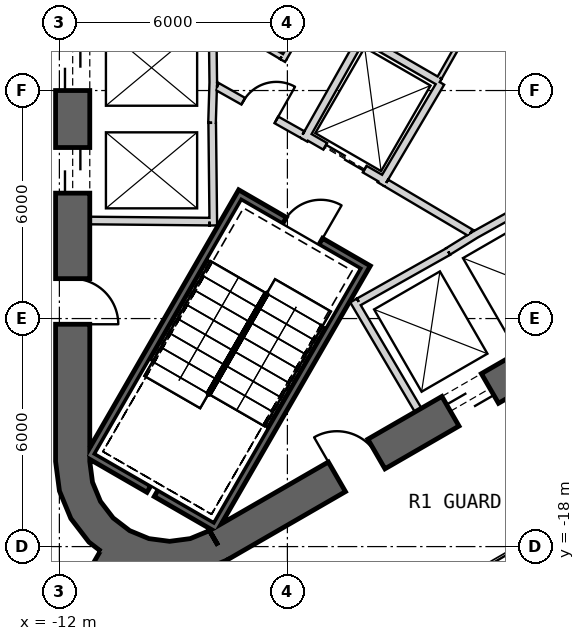
"""IFC4 building model, lengths in metres.
Left out: names, types, materials, properties, quantities, classifications, styles, units other than length and angle.
Written with IfcOpenShell. Run it as: python <this file> out.ifc"""

import sys

from ifc_helpers import new_model, si_unit, direction, frame, frame_2d, origin, place, context, subcontext, project, spatial, polyline, rectangle, outline, extrude, element, fill, save


model = new_model("IFC4")
c1 = context("Model", 3, precision=1e-05, world=origin(), true_north=direction((0.0, 1.0)))
c2 = subcontext(c1, "Body", "Model", "MODEL_VIEW")
j1 = project(units=[si_unit("LENGTHUNIT", "METRE"), si_unit("PLANEANGLEUNIT", "RADIAN")], contexts=[c1])
p1 = place(None, origin())
s1 = spatial("IfcSite", under=j1, at=p1, CompositionType="ELEMENT")
p2 = place(p1, origin())
s2 = spatial("IfcBuilding", under=s1, at=p2, CompositionType="ELEMENT")
p3 = place(p2, frame((0.0, 0.0, 27.5)))
s3 = spatial("IfcBuildingStorey", under=s2, at=p3, CompositionType="ELEMENT", Elevation=27.5)
p4 = place(p3, frame((-11.65, 15.762, 0.0), z_axis=(0.0, 0.0, 1.0), x_axis=(0.0, -1.0, 0.0)))
e1 = element("IfcWall", 1, at=p4, inside=s3, PredefinedType="SHEAR", context=c2, shape_type="SweptSolid", body=[
    extrude(rectangle(XDim=31.523, YDim=0.9, at=frame_2d((15.762, 0.0))), origin(), (0.0, 0.0, 1.0), 6.0),
])
p5 = place(p4, frame((7.062, 0.0, 0.0)))
e2 = element("IfcOpeningElement", 2, at=p5, cuts=e1, PredefinedType="OPENING", context=c2, shape_type="SweptSolid", body=[
    extrude(rectangle(XDim=1.2, YDim=2.4, at=frame_2d((0.6, 1.2))), frame((0.0, 0.46, 0.0), z_axis=(0.0, -1.0, 0.0), x_axis=(1.0, 0.0, 0.0)), (0.0, 0.0, 1.0), 0.92),
])
p6 = place(p4, frame((9.762, 0.0, 0.0)))
e3 = element("IfcOpeningElement", 3, at=p6, cuts=e1, PredefinedType="OPENING", context=c2, shape_type="SweptSolid", body=[
    extrude(rectangle(XDim=1.2, YDim=2.4, at=frame_2d((0.6, 1.2))), frame((0.0, 0.46, 0.0), z_axis=(0.0, -1.0, 0.0), x_axis=(1.0, 0.0, 0.0)), (0.0, 0.0, 1.0), 0.92),
])
p7 = place(p4, frame((12.462, 0.0, 0.0)))
e4 = element("IfcOpeningElement", 4, at=p7, cuts=e1, PredefinedType="OPENING", context=c2, shape_type="SweptSolid", body=[
    extrude(rectangle(XDim=1.2, YDim=2.4, at=frame_2d((0.6, 1.2))), frame((0.0, 0.46, 0.0), z_axis=(0.0, -1.0, 0.0), x_axis=(1.0, 0.0, 0.0)), (0.0, 0.0, 1.0), 0.92),
])
p8 = place(p4, frame((15.162, 0.0, 0.0)))
e5 = element("IfcOpeningElement", 5, at=p8, cuts=e1, PredefinedType="OPENING", context=c2, shape_type="SweptSolid", body=[
    extrude(rectangle(XDim=1.2, YDim=2.4, at=frame_2d((0.6, 1.2))), frame((0.0, 0.46, 0.0), z_axis=(0.0, -1.0, 0.0), x_axis=(1.0, 0.0, 0.0)), (0.0, 0.0, 1.0), 0.92),
])
p9 = place(p4, frame((17.862, 0.0, 0.0)))
e6 = element("IfcOpeningElement", 6, at=p9, cuts=e1, PredefinedType="OPENING", context=c2, shape_type="SweptSolid", body=[
    extrude(rectangle(XDim=1.2, YDim=2.4, at=frame_2d((0.6, 1.2))), frame((0.0, 0.46, 0.0), z_axis=(0.0, -1.0, 0.0), x_axis=(1.0, 0.0, 0.0)), (0.0, 0.0, 1.0), 0.92),
])
p10 = place(p4, frame((20.562, 0.0, 0.0)))
e7 = element("IfcOpeningElement", 7, at=p10, cuts=e1, PredefinedType="OPENING", context=c2, shape_type="SweptSolid", body=[
    extrude(rectangle(XDim=1.2, YDim=2.4, at=frame_2d((0.6, 1.2))), frame((0.0, 0.46, 0.0), z_axis=(0.0, -1.0, 0.0), x_axis=(1.0, 0.0, 0.0)), (0.0, 0.0, 1.0), 0.92),
])
p11 = place(p4, frame((23.262, 0.0, 0.0)))
e8 = element("IfcOpeningElement", 8, at=p11, cuts=e1, PredefinedType="OPENING", context=c2, shape_type="SweptSolid", body=[
    extrude(rectangle(XDim=1.2, YDim=2.4, at=frame_2d((0.6, 1.2))), frame((0.0, 0.46, 0.0), z_axis=(0.0, -1.0, 0.0), x_axis=(1.0, 0.0, 0.0)), (0.0, 0.0, 1.0), 0.92),
])
p12 = place(p4, frame((3.612, 0.0, 0.0)))
e9 = element("IfcOpeningElement", 9, at=p12, cuts=e1, PredefinedType="OPENING", context=c2, shape_type="SweptSolid", body=[
    extrude(rectangle(XDim=1.2, YDim=2.4, at=frame_2d((0.6, 1.2))), frame((0.0, 0.46, 0.0), z_axis=(0.0, -1.0, 0.0), x_axis=(1.0, 0.0, 0.0)), (0.0, 0.0, 1.0), 0.92),
])
p13 = place(p4, frame((26.712, 0.0, 0.0)))
e10 = element("IfcOpeningElement", 10, at=p13, cuts=e1, PredefinedType="OPENING", context=c2, shape_type="SweptSolid", body=[
    extrude(rectangle(XDim=1.2, YDim=2.4, at=frame_2d((0.6, 1.2))), frame((0.0, 0.46, 0.0), z_axis=(0.0, -1.0, 0.0), x_axis=(1.0, 0.0, 0.0)), (0.0, 0.0, 1.0), 0.92),
])
p14 = place(p3, frame((-7.825, -17.97, 0.0), z_axis=(0.0, 0.0, 1.0), x_axis=(0.866028369851, 0.499994862586, 0.0)))
e11 = element("IfcWall", 11, at=p14, inside=s3, PredefinedType="SHEAR", context=c2, shape_type="SweptSolid", body=[
    extrude(rectangle(XDim=31.523, YDim=0.9, at=frame_2d((15.762, 0.0))), origin(), (0.0, 0.0, 1.0), 6.0),
])
p15 = place(p14, frame((7.062, 0.0, 0.0)))
e12 = element("IfcOpeningElement", 12, at=p15, cuts=e11, PredefinedType="OPENING", context=c2, shape_type="SweptSolid", body=[
    extrude(rectangle(XDim=1.2, YDim=2.4, at=frame_2d((0.6, 1.2))), frame((0.0, 0.46, 0.0), z_axis=(0.0, -1.0, 0.0), x_axis=(1.0, 0.0, 0.0)), (0.0, 0.0, 1.0), 0.92),
])
p16 = place(p14, frame((9.762, 0.0, 0.0)))
e13 = element("IfcOpeningElement", 13, at=p16, cuts=e11, PredefinedType="OPENING", context=c2, shape_type="SweptSolid", body=[
    extrude(rectangle(XDim=1.2, YDim=2.4, at=frame_2d((0.6, 1.2))), frame((0.0, 0.46, 0.0), z_axis=(0.0, -1.0, 0.0), x_axis=(1.0, 0.0, 0.0)), (0.0, 0.0, 1.0), 0.92),
])
p17 = place(p14, frame((12.462, 0.0, 0.0)))
e14 = element("IfcOpeningElement", 14, at=p17, cuts=e11, PredefinedType="OPENING", context=c2, shape_type="SweptSolid", body=[
    extrude(rectangle(XDim=1.2, YDim=2.4, at=frame_2d((0.6, 1.2))), frame((0.0, 0.46, 0.0), z_axis=(0.0, -1.0, 0.0), x_axis=(1.0, 0.0, 0.0)), (0.0, 0.0, 1.0), 0.92),
])
p18 = place(p14, frame((15.162, 0.0, 0.0)))
e15 = element("IfcOpeningElement", 15, at=p18, cuts=e11, PredefinedType="OPENING", context=c2, shape_type="SweptSolid", body=[
    extrude(rectangle(XDim=1.2, YDim=2.4, at=frame_2d((0.6, 1.2))), frame((0.0, 0.46, 0.0), z_axis=(0.0, -1.0, 0.0), x_axis=(1.0, 0.0, 0.0)), (0.0, 0.0, 1.0), 0.92),
])
p19 = place(p14, frame((17.862, 0.0, 0.0)))
e16 = element("IfcOpeningElement", 16, at=p19, cuts=e11, PredefinedType="OPENING", context=c2, shape_type="SweptSolid", body=[
    extrude(rectangle(XDim=1.2, YDim=2.4, at=frame_2d((0.6, 1.2))), frame((0.0, 0.46, 0.0), z_axis=(0.0, -1.0, 0.0), x_axis=(1.0, 0.0, 0.0)), (0.0, 0.0, 1.0), 0.92),
])
p20 = place(p14, frame((20.562, 0.0, 0.0)))
e17 = element("IfcOpeningElement", 17, at=p20, cuts=e11, PredefinedType="OPENING", context=c2, shape_type="SweptSolid", body=[
    extrude(rectangle(XDim=1.2, YDim=2.4, at=frame_2d((0.6, 1.2))), frame((0.0, 0.46, 0.0), z_axis=(0.0, -1.0, 0.0), x_axis=(1.0, 0.0, 0.0)), (0.0, 0.0, 1.0), 0.92),
])
p21 = place(p14, frame((26.712, 0.0, 0.0)))
e18 = element("IfcOpeningElement", 18, at=p21, cuts=e11, PredefinedType="OPENING", context=c2, shape_type="SweptSolid", body=[
    extrude(rectangle(XDim=1.2, YDim=2.4, at=frame_2d((0.6, 1.2))), frame((0.0, 0.46, 0.0), z_axis=(0.0, -1.0, 0.0), x_axis=(1.0, 0.0, 0.0)), (0.0, 0.0, 1.0), 0.92),
])
p22 = place(p14, frame((3.612, 0.0, 0.0)))
e19 = element("IfcOpeningElement", 19, at=p22, cuts=e11, PredefinedType="OPENING", context=c2, shape_type="SweptSolid", body=[
    extrude(rectangle(XDim=1.2, YDim=2.4, at=frame_2d((0.6, 1.2))), frame((0.0, 0.46, 0.0), z_axis=(0.0, -1.0, 0.0), x_axis=(1.0, 0.0, 0.0)), (0.0, 0.0, 1.0), 0.92),
])
p23 = place(p3, origin())
e20 = element("IfcWall", 20, at=p23, inside=s3, PredefinedType="SHEAR", context=c2, shape_type="SweptSolid", body=[
    extrude(outline(polyline([(-12.1, -15.762), (-11.998, -16.538), (-11.698, -17.262), (-11.221, -17.883), (-10.6, -18.36), (-9.876, -18.659), (-9.1, -18.762), (-8.323, -18.659), (-7.6, -18.36), (-8.05, -17.58), (-8.556, -17.79), (-9.1, -17.862), (-9.644, -17.79), (-10.15, -17.58), (-10.585, -17.247), (-10.919, -16.812), (-11.128, -16.305), (-11.2, -15.762), (-12.1, -15.762)])), origin(), (0.0, 0.0, 1.0), 6.0),
])
p24 = place(p3, frame((-10.575, -18.316, 0.0), z_axis=(0.0, 0.0, 1.0), x_axis=(-0.499996575515, -0.866027380903, 0.0)))
e21 = element("IfcWall", 21, at=p24, inside=s3, PredefinedType="SHEAR", context=c2, shape_type="SweptSolid", body=[
    extrude(rectangle(XDim=13.954, YDim=0.8, at=frame_2d((6.977, 0.0))), origin(), (0.0, 0.0, 1.0), 6.0),
])
p25 = place(p24, frame((2.05, 0.0, 0.0)))
e22 = element("IfcOpeningElement", 22, at=p25, cuts=e21, PredefinedType="OPENING", context=c2, shape_type="SweptSolid", body=[
    extrude(rectangle(XDim=1.4, YDim=2.4, at=frame_2d((0.7, 1.2))), frame((0.0, 0.41, 0.0), z_axis=(0.0, -1.0, 0.0), x_axis=(1.0, 0.0, 0.0)), (0.0, 0.0, 1.0), 0.82),
])
p26 = place(p3, frame((-7.95, -5.772, 0.0), z_axis=(0.0, 0.0, 1.0), x_axis=(-0.030803413295, -0.999525462272, 0.0)))
e23 = element("IfcWall", 23, at=p26, inside=s3, PredefinedType="PLUMBINGWALL", context=c2, shape_type="SweptSolid", body=[
    extrude(rectangle(XDim=1.078, YDim=0.2, at=frame_2d((0.539, 0.0))), origin(), (0.0, 0.0, 1.0), 5.7),
])
p27 = place(p3, frame((-7.971, -4.05, 0.0), z_axis=(0.0, 0.0, 1.0), x_axis=(0.012042535896, -0.999927486035, 0.0)))
e24 = element("IfcWall", 24, at=p27, inside=s3, PredefinedType="PLUMBINGWALL", context=c2, shape_type="SweptSolid", body=[
    extrude(rectangle(XDim=1.845, YDim=0.2, at=frame_2d((0.922, 0.0))), origin(), (0.0, 0.0, 1.0), 5.7),
])
p28 = place(p3, frame((-7.979, -6.85, 0.0), z_axis=(0.0, 0.0, 1.0), x_axis=(0.011121475088, -0.999938154483, 0.0)))
e25 = element("IfcWall", 25, at=p28, inside=s3, PredefinedType="PLUMBINGWALL", context=c2, shape_type="SweptSolid", body=[
    extrude(rectangle(XDim=2.7, YDim=0.2, at=frame_2d((1.35, 0.0))), origin(), (0.0, 0.0, 1.0), 5.7),
])
p29 = place(p3, frame((-8.05, -9.449, 0.0), z_axis=(0.0, 0.0, 1.0), x_axis=(-0.999957467379, 0.009222983926, 0.0)))
e26 = element("IfcWall", 26, at=p29, inside=s3, PredefinedType="PLUMBINGWALL", context=c2, shape_type="SweptSolid", body=[
    extrude(rectangle(XDim=3.15, YDim=0.2, at=frame_2d((1.575, 0.0))), origin(), (0.0, 0.0, 1.0), 5.7),
])
p30 = place(p3, frame((-2.558, -14.409, 0.0), z_axis=(0.0, 0.0, 1.0), x_axis=(-0.507997497166, 0.861358544901, 0.0)))
e27 = element("IfcWall", 27, at=p30, inside=s3, PredefinedType="PLUMBINGWALL", context=c2, shape_type="SweptSolid", body=[
    extrude(rectangle(XDim=3.35, YDim=0.2, at=frame_2d((1.675, 0.0))), origin(), (0.0, 0.0, 1.0), 5.7),
])
p31 = place(p3, frame((-1.769, -10.237, 0.0), z_axis=(0.0, 0.0, 1.0), x_axis=(-0.871534483978, -0.490334215854, 0.0)))
e28 = element("IfcWall", 28, at=p31, inside=s3, PredefinedType="PLUMBINGWALL", context=c2, shape_type="SweptSolid", body=[
    extrude(rectangle(XDim=2.7, YDim=0.2, at=frame_2d((1.35, 0.0))), origin(), (0.0, 0.0, 1.0), 5.7),
])
p32 = place(p3, frame((-1.024, -9.771, 0.0), z_axis=(0.0, 0.0, 1.0), x_axis=(-0.850348075135, -0.526220629693, 0.0)))
e29 = element("IfcWall", 29, at=p32, inside=s3, PredefinedType="PLUMBINGWALL", context=c2, shape_type="SweptSolid", body=[
    extrude(rectangle(XDim=0.878, YDim=0.2, at=frame_2d((0.439, 0.0))), origin(), (0.0, 0.0, 1.0), 5.7),
])
p33 = place(p3, frame((-1.13, -9.831, 0.0), z_axis=(0.0, 0.0, 1.0), x_axis=(0.874269620932, 0.485440655401, 0.0)))
e30 = element("IfcWall", 30, at=p33, inside=s3, PredefinedType="PLUMBINGWALL", context=c2, shape_type="SweptSolid", body=[
    extrude(rectangle(XDim=1.845, YDim=0.2, at=frame_2d((0.922, 0.0))), origin(), (0.0, 0.0, 1.0), 5.7),
])
p34 = place(p3, frame((-3.905, -10.563, -0.3), z_axis=(0.0, 0.0, 1.0), x_axis=(-0.500012932018, -0.866017937352, 0.0)))
e31 = element("IfcWall", 31, at=p34, inside=s3, PredefinedType="SHEAR", context=c2, shape_type="SweptSolid", body=[
    extrude(rectangle(XDim=8.1, YDim=0.2, at=frame_2d((4.05, 0.0))), origin(), (0.0, 0.0, 1.0), 6.0),
])
p35 = place(p3, frame((-11.282, -15.541, -0.3), z_axis=(0.0, 0.0, 1.0), x_axis=(0.866000578957, -0.500042995397, 0.0)))
e32 = element("IfcWall", 32, at=p35, inside=s3, PredefinedType="SHEAR", context=c2, shape_type="SweptSolid", body=[
    extrude(rectangle(XDim=1.89, YDim=0.2, at=frame_2d((0.945, 0.0))), origin(), (0.0, 0.0, 1.0), 6.0),
])
p36 = place(p3, frame((-9.455, -16.596, -0.3), z_axis=(0.0, 0.0, 1.0), x_axis=(0.866038843867, -0.499976720371, 0.0)))
e33 = element("IfcWall", 33, at=p36, inside=s3, PredefinedType="SHEAR", context=c2, shape_type="SweptSolid", body=[
    extrude(rectangle(XDim=1.69, YDim=0.2, at=frame_2d((0.845, 0.0))), origin(), (0.0, 0.0, 1.0), 6.0),
])
p37 = place(p3, frame((-7.196, -8.663, -0.3), z_axis=(0.0, 0.0, 1.0), x_axis=(-0.499997992926, -0.866026562566, 0.0)))
e34 = element("IfcWall", 34, at=p37, inside=s3, PredefinedType="SHEAR", context=c2, shape_type="SweptSolid", body=[
    extrude(rectangle(XDim=7.9, YDim=0.2, at=frame_2d((3.95, 0.0))), origin(), (0.0, 0.0, 1.0), 6.0),
])
p38 = place(p3, frame((-4.041, -10.599, -0.3), z_axis=(0.0, 0.0, 1.0), x_axis=(-0.866047807691, 0.499961193289, 0.0)))
e35 = element("IfcWall", 35, at=p38, inside=s3, PredefinedType="SHEAR", context=c2, shape_type="SweptSolid", body=[
    extrude(rectangle(XDim=3.6, YDim=0.2, at=frame_2d((1.8, 0.0))), origin(), (0.0, 0.0, 1.0), 6.0),
])
p39 = place(p38, frame((1.25, 0.0, 0.3)))
e36 = element("IfcOpeningElement", 36, at=p39, cuts=e35, PredefinedType="OPENING", context=c2, shape_type="SweptSolid", body=[
    extrude(rectangle(XDim=1.1, YDim=2.1, at=frame_2d((0.55, 1.05))), frame((0.0, 0.11, 0.0), z_axis=(0.0, -1.0, 0.0), x_axis=(1.0, 0.0, 0.0)), (0.0, 0.0, 1.0), 0.22),
])
p40 = place(p3, frame((-3.446, -8.368, 0.0), z_axis=(0.0, 0.0, 1.0), x_axis=(-0.866024647952, 0.500001309137, 0.0)))
e37 = element("IfcWall", 37, at=p40, inside=s3, PredefinedType="PLUMBINGWALL", context=c2, shape_type="SweptSolid", body=[
    extrude(rectangle(XDim=2.4, YDim=0.2, at=frame_2d((1.2, 0.0))), origin(), (0.0, 0.0, 1.0), 5.7),
])
p41 = place(p40, frame((0.6, 0.0, 0.0)))
e38 = element("IfcOpeningElement", 38, at=p41, cuts=e37, PredefinedType="OPENING", context=c2, shape_type="SweptSolid", body=[
    extrude(rectangle(XDim=1.2, YDim=2.4, at=frame_2d((0.6, 1.2))), frame((0.0, 0.11, 0.0), z_axis=(0.0, -1.0, 0.0), x_axis=(1.0, 0.0, 0.0)), (0.0, 0.0, 1.0), 0.22),
])
p42 = place(p3, frame((-1.961, -5.796, 0.0), z_axis=(0.0, 0.0, 1.0), x_axis=(-0.508647062354, -0.860975125052, 0.0)))
e39 = element("IfcWall", 39, at=p42, inside=s3, PredefinedType="PLUMBINGWALL", context=c2, shape_type="SweptSolid", body=[
    extrude(rectangle(XDim=3.1, YDim=0.2, at=frame_2d((1.55, 0.0))), origin(), (0.0, 0.0, 1.0), 5.7),
])
p43 = place(p3, frame((-3.99, -4.509, 0.0), z_axis=(0.0, 0.0, 1.0), x_axis=(-0.491358283181, -0.870957540612, 0.0)))
e40 = element("IfcWall", 40, at=p43, inside=s3, PredefinedType="PLUMBINGWALL", context=c2, shape_type="SweptSolid", body=[
    extrude(rectangle(XDim=3.2, YDim=0.2, at=frame_2d((1.6, 0.0))), origin(), (0.0, 0.0, 1.0), 5.7),
])
p44 = place(p3, frame((-3.953, -4.646, 0.0), z_axis=(0.0, 0.0, 1.0), x_axis=(0.866065302921, -0.4999308863, 0.0)))
e41 = element("IfcWall", 41, at=p44, inside=s3, PredefinedType="PLUMBINGWALL", context=c2, shape_type="SweptSolid", body=[
    extrude(rectangle(XDim=2.264, YDim=0.2, at=frame_2d((1.132, 0.0))), origin(), (0.0, 0.0, 1.0), 5.7),
])
p45 = place(p3, frame((-3.401, -8.43, 0.0), z_axis=(0.0, 0.0, 1.0), x_axis=(0.860615607571, -0.509255118781, 0.0)))
e42 = element("IfcWall", 42, at=p45, inside=s3, PredefinedType="PARTITIONING", context=c2, shape_type="SweptSolid", body=[
    extrude(rectangle(XDim=2.581, YDim=0.2, at=frame_2d((1.29, 0.0))), origin(), (0.0, 0.0, 1.0), 5.7),
])
p46 = place(p3, frame((-7.849, -5.894, 0.0), z_axis=(0.0, 0.0, 1.0), x_axis=(0.871363259478, -0.490638431059, 0.0)))
e43 = element("IfcWall", 43, at=p46, inside=s3, PredefinedType="PARTITIONING", context=c2, shape_type="SweptSolid", body=[
    extrude(rectangle(XDim=2.581, YDim=0.2, at=frame_2d((1.291, 0.0))), origin(), (0.0, 0.0, 1.0), 5.7),
])
p47 = place(p46, frame((0.791, 0.0, 0.0)))
e44 = element("IfcOpeningElement", 44, at=p47, cuts=e43, PredefinedType="OPENING", context=c2, shape_type="SweptSolid", body=[
    extrude(rectangle(XDim=1.0, YDim=2.1, at=frame_2d((0.5, 1.05))), frame((0.0, 0.11, 0.0), z_axis=(0.0, -1.0, 0.0), x_axis=(1.0, 0.0, 0.0)), (0.0, 0.0, 1.0), 0.22),
])
p48 = place(p3, frame((0.224, -1.761, 0.0), z_axis=(0.0, 0.0, 1.0), x_axis=(-0.494327216836, -0.869275907118, 0.0)))
e45 = element("IfcWall", 45, at=p48, inside=s3, PredefinedType="PARTITIONING", context=c2, shape_type="SweptSolid", body=[
    extrude(rectangle(XDim=4.487, YDim=0.12, at=frame_2d((2.244, 0.0))), origin(), (0.0, 0.0, 1.0), 5.7),
])
p49 = place(p48, frame((1.895, 0.0, 0.0)))
e46 = element("IfcOpeningElement", 46, at=p49, cuts=e45, PredefinedType="OPENING", context=c2, shape_type="SweptSolid", body=[
    extrude(rectangle(XDim=0.8, YDim=2.1, at=frame_2d((0.4, 1.05))), frame((0.0, 0.07, 0.0), z_axis=(0.0, -1.0, 0.0), x_axis=(1.0, 0.0, 0.0)), (0.0, 0.0, 1.0), 0.14),
])
p50 = place(p3, frame((-6.126, -5.21, 0.0), z_axis=(0.0, 0.0, 1.0), x_axis=(0.499990139034, 0.866031096941, 0.0)))
e47 = element("IfcWall", 47, at=p50, inside=s3, PredefinedType="PLUMBINGWALL", context=c2, shape_type="SweptSolid", body=[
    extrude(rectangle(XDim=3.0, YDim=0.15, at=frame_2d((1.5, 0.0))), origin(), (0.0, 0.0, 1.0), 5.7),
])
p51 = place(p3, frame((-7.95, -4.041, 0.0), z_axis=(0.0, 0.0, 1.0), x_axis=(0.860090281069, -0.510141851263, 0.0)))
e48 = element("IfcWall", 48, at=p51, inside=s3, PredefinedType="PLUMBINGWALL", context=c2, shape_type="SweptSolid", body=[
    extrude(rectangle(XDim=2.089, YDim=0.15, at=frame_2d((1.045, 0.0))), origin(), (0.0, 0.0, 1.0), 5.7),
])
p52 = place(p39, origin())
e49 = element("IfcDoor", 49, at=p52, inside=s3, OperationType="SINGLE_SWING_LEFT", PredefinedType="USERDEFINED", context=c2, shape_type="SweptSolid", body=[
    extrude(rectangle(XDim=1.1, YDim=2.1, at=frame_2d((0.55, 1.05))), frame((0.0, 0.025, 0.0), z_axis=(0.0, -1.0, 0.0), x_axis=(1.0, 0.0, 0.0)), (0.0, 0.0, 1.0), 0.05),
])
fill(e36, e49)
p53 = place(p47, origin())
e50 = element("IfcDoor", 50, at=p53, inside=s3, OperationType="SINGLE_SWING_RIGHT", PredefinedType="USERDEFINED", context=c2, shape_type="SweptSolid", body=[
    extrude(rectangle(XDim=1.0, YDim=2.1, at=frame_2d((0.5, 1.05))), frame((0.0, 0.025, 0.0), z_axis=(0.0, -1.0, 0.0), x_axis=(1.0, 0.0, 0.0)), (0.0, 0.0, 1.0), 0.05),
])
fill(e44, e50)
p54 = place(p41, origin())
e51 = element("IfcDoor", 51, at=p54, inside=s3, OperationType="SLIDING_TO_LEFT", PredefinedType="USERDEFINED", context=c2, shape_type="SweptSolid", body=[
    extrude(rectangle(XDim=1.2, YDim=2.4, at=frame_2d((0.6, 1.2))), frame((0.0, 0.025, 0.0), z_axis=(0.0, -1.0, 0.0), x_axis=(1.0, 0.0, 0.0)), (0.0, 0.0, 1.0), 0.05),
])
fill(e38, e51)
p55 = place(p10, origin())
e52 = element("IfcDoor", 52, at=p55, inside=s3, OperationType="SLIDING_TO_LEFT", PredefinedType="USERDEFINED", context=c2, shape_type="SweptSolid", body=[
    extrude(rectangle(XDim=1.2, YDim=2.4, at=frame_2d((0.6, 1.2))), frame((0.0, 0.025, 0.0), z_axis=(0.0, -1.0, 0.0), x_axis=(1.0, 0.0, 0.0)), (0.0, 0.0, 1.0), 0.05),
])
fill(e7, e52)
p56 = place(p11, origin())
e53 = element("IfcDoor", 53, at=p56, inside=s3, OperationType="SLIDING_TO_LEFT", PredefinedType="USERDEFINED", context=c2, shape_type="SweptSolid", body=[
    extrude(rectangle(XDim=1.2, YDim=2.4, at=frame_2d((0.6, 1.2))), frame((0.0, 0.025, 0.0), z_axis=(0.0, -1.0, 0.0), x_axis=(1.0, 0.0, 0.0)), (0.0, 0.0, 1.0), 0.05),
])
fill(e8, e53)
p57 = place(p15, origin())
e54 = element("IfcDoor", 54, at=p57, inside=s3, OperationType="SLIDING_TO_LEFT", PredefinedType="USERDEFINED", context=c2, shape_type="SweptSolid", body=[
    extrude(rectangle(XDim=1.2, YDim=2.4, at=frame_2d((0.6, 1.2))), frame((0.0, 0.025, 0.0), z_axis=(0.0, -1.0, 0.0), x_axis=(1.0, 0.0, 0.0)), (0.0, 0.0, 1.0), 0.05),
])
fill(e12, e54)
p58 = place(p13, origin())
e55 = element("IfcDoor", 55, at=p58, inside=s3, OperationType="SINGLE_SWING_RIGHT", PredefinedType="USERDEFINED", context=c2, shape_type="SweptSolid", body=[
    extrude(rectangle(XDim=1.2, YDim=2.4, at=frame_2d((0.6, 1.2))), frame((0.0, 0.025, 0.0), z_axis=(0.0, -1.0, 0.0), x_axis=(1.0, 0.0, 0.0)), (0.0, 0.0, 1.0), 0.05),
])
fill(e10, e55)
p59 = place(p22, origin())
e56 = element("IfcDoor", 56, at=p59, inside=s3, OperationType="SINGLE_SWING_LEFT", PredefinedType="USERDEFINED", context=c2, shape_type="SweptSolid", body=[
    extrude(rectangle(XDim=1.2, YDim=2.4, at=frame_2d((0.6, 1.2))), frame((0.0, 0.025, 0.0), z_axis=(0.0, -1.0, 0.0), x_axis=(1.0, 0.0, 0.0)), (0.0, 0.0, 1.0), 0.05),
])
fill(e19, e56)
save(model, sys.argv[1])
